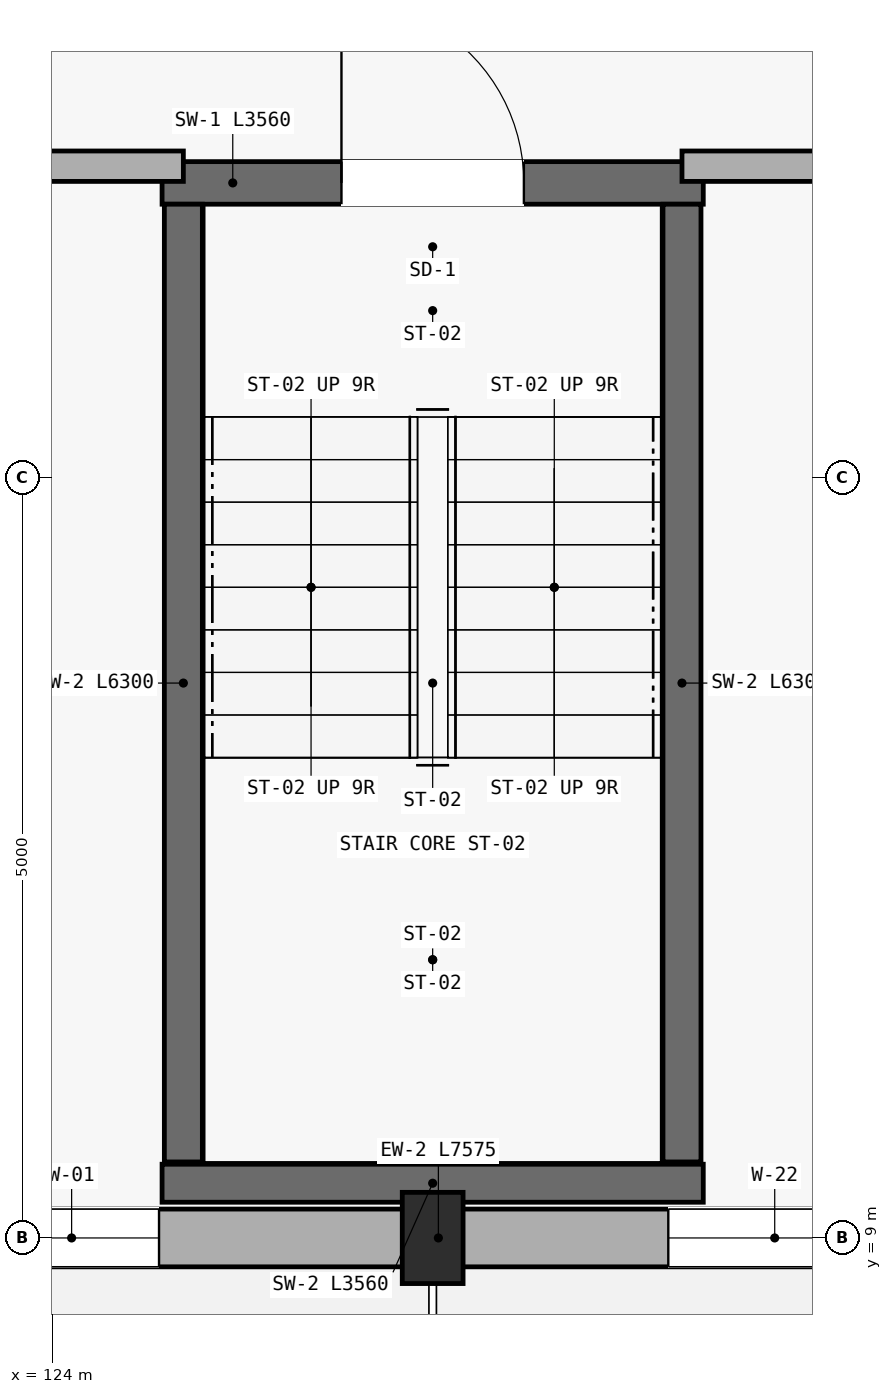
"""IFC4 building model, lengths in metres.
Left out: names, types, materials, properties, quantities, classifications, styles, units other than length and angle.
Written with IfcOpenShell. Run it as: python <this file> out.ifc"""

import sys

from ifc_helpers import new_model, si_unit, direction, frame, frame_2d, origin, origin_2d, place, context, subcontext, project, spatial, rectangle, extrude, element, fill, save


model = new_model("IFC4")
c1 = context("Model", 3, precision=1e-05, world=origin(), true_north=direction((0.0, 1.0)))
c2 = subcontext(c1, "Body", "Model", "MODEL_VIEW")
j1 = project(units=[si_unit("LENGTHUNIT", "METRE"), si_unit("PLANEANGLEUNIT", "RADIAN")], contexts=[c1])
p1 = place(None, origin())
s1 = spatial("IfcSite", under=j1, at=p1, CompositionType="ELEMENT")
p2 = place(p1, origin())
s2 = spatial("IfcBuilding", under=s1, at=p2, CompositionType="ELEMENT")
p3 = place(p2, origin())
s3 = spatial("IfcBuildingStorey", under=s2, at=p3, CompositionType="ELEMENT", Elevation=0.0)
p4 = place(p3, frame((126.5, 9.0, 0.0), z_axis=(0.0, 0.0, 1.0), x_axis=(1.0, 0.0, 0.0)))
e1 = element("IfcColumn", 1, at=p4, inside=s3, PredefinedType="PILASTER", context=c2, shape_type="SweptSolid", body=[
    extrude(rectangle(XDim=0.4, YDim=0.6, at=origin_2d()), origin(), (0.0, 0.0, 1.0), 5.85),
])
p5 = place(p3, frame((122.75, 9.0, 0.0), z_axis=(0.0, 0.0, 1.0), x_axis=(1.0, 0.0, 0.0)))
e2 = element("IfcWall", 2, at=p5, inside=s3, PredefinedType="STANDARD", context=c2, shape_type="SweptSolid", body=[
    extrude(rectangle(XDim=7.575, YDim=0.38, at=frame_2d((3.788, 0.0))), origin(), (0.0, 0.0, 1.0), 4.75),
])
p6 = place(p5, frame((0.8, 0.0, 0.75)))
e3 = element("IfcOpeningElement", 3, at=p6, cuts=e2, PredefinedType="OPENING", context=c2, shape_type="SweptSolid", body=[
    extrude(rectangle(XDim=1.15, YDim=1.45, at=frame_2d((0.575, 0.725))), frame((0.0, 0.2, 0.0), z_axis=(0.0, -1.0, 0.0), x_axis=(1.0, 0.0, 0.0)), (0.0, 0.0, 1.0), 0.4),
])
p7 = place(p5, frame((5.3, 0.0, 0.75)))
e4 = element("IfcOpeningElement", 4, at=p7, cuts=e2, PredefinedType="OPENING", context=c2, shape_type="SweptSolid", body=[
    extrude(rectangle(XDim=1.4, YDim=1.45, at=frame_2d((0.7, 0.725))), frame((0.0, 0.2, 0.0), z_axis=(0.0, -1.0, 0.0), x_axis=(1.0, 0.0, 0.0)), (0.0, 0.0, 1.0), 0.4),
])
p8 = place(p3, frame((124.72, 15.94, 0.0), z_axis=(0.0, 0.0, 1.0), x_axis=(1.0, 0.0, 0.0)))
e5 = element("IfcWall", 5, at=p8, inside=s3, PredefinedType="SHEAR", context=c2, shape_type="SweptSolid", body=[
    extrude(rectangle(XDim=3.56, YDim=0.28, at=frame_2d((1.78, 0.0))), origin(), (0.0, 0.0, 1.0), 5.6),
])
p9 = place(p8, frame((1.18, 0.0, 0.0)))
e6 = element("IfcOpeningElement", 6, at=p9, cuts=e5, PredefinedType="OPENING", context=c2, shape_type="SweptSolid", body=[
    extrude(rectangle(XDim=1.2, YDim=2.15, at=frame_2d((0.6, 1.075))), frame((0.0, 0.15, 0.0), z_axis=(0.0, -1.0, 0.0), x_axis=(1.0, 0.0, 0.0)), (0.0, 0.0, 1.0), 0.3),
])
p10 = place(p3, frame((128.28, 9.36, 0.0), z_axis=(0.0, 0.0, 1.0), x_axis=(-1.0, 0.0, 0.0)))
e7 = element("IfcWall", 7, at=p10, inside=s3, PredefinedType="SHEAR", context=c2, shape_type="SweptSolid", body=[
    extrude(rectangle(XDim=3.56, YDim=0.25, at=frame_2d((1.78, 0.0))), origin(), (0.0, 0.0, 1.0), 5.6),
])
for number, where, z_axis, x_axis in (
    (8, (124.86, 15.8, 0.0), (0.0, 0.0, 1.0), (0.0, -1.0, 0.0)),
    (9, (128.14, 9.5, 0.0), (0.0, 0.0, 1.0), (0.0, 1.0, 0.0)),
):
    element("IfcWall", number, at=place(p3, frame(where, z_axis=z_axis, x_axis=x_axis)), inside=s3, PredefinedType="SHEAR", context=c2, shape_type="SweptSolid", body=[
        extrude(rectangle(XDim=6.3, YDim=0.25, at=frame_2d((3.15, 0.0))), origin(), (0.0, 0.0, 1.0), 5.6),
    ])
p11 = place(p3, frame((121.13, 16.05, 0.0), z_axis=(0.0, 0.0, 1.0), x_axis=(1.0, 0.0, 0.0)))
e10 = element("IfcWall", 10, at=p11, inside=s3, PredefinedType="PARTITIONING", context=c2, shape_type="SweptSolid", body=[
    extrude(rectangle(XDim=3.73, YDim=0.2, at=frame_2d((1.865, 0.0))), origin(), (0.0, 0.0, 1.0), 4.19),
])
p12 = place(p3, frame((128.14, 16.05, 0.0), z_axis=(0.0, 0.0, 1.0), x_axis=(1.0, 0.0, 0.0)))
e11 = element("IfcWall", 11, at=p12, inside=s3, PredefinedType="PARTITIONING", context=c2, shape_type="SweptSolid", body=[
    extrude(rectangle(XDim=10.96, YDim=0.2, at=frame_2d((5.48, 0.0))), origin(), (0.0, 0.0, 1.0), 4.19),
])
p13 = place(p12, frame((4.98, 0.0, 0.0)))
e12 = element("IfcOpeningElement", 12, at=p13, cuts=e11, PredefinedType="OPENING", context=c2, shape_type="SweptSolid", body=[
    extrude(rectangle(XDim=1.0, YDim=2.12, at=frame_2d((0.5, 1.06))), frame((0.0, 0.11, 0.0), z_axis=(0.0, -1.0, 0.0), x_axis=(1.0, 0.0, 0.0)), (0.0, 0.0, 1.0), 0.22),
])
p14 = place(p6, origin())
e13 = element("IfcWindow", 13, at=p14, inside=s3, PartitioningType="SINGLE_PANEL", PredefinedType="WINDOW", context=c2, shape_type="SweptSolid", body=[
    extrude(rectangle(XDim=1.15, YDim=1.45, at=frame_2d((0.575, 0.725))), frame((0.0, 0.03, 0.0), z_axis=(0.0, -1.0, 0.0), x_axis=(1.0, 0.0, 0.0)), (0.0, 0.0, 1.0), 0.06),
])
fill(e3, e13)
p15 = place(p7, origin())
e14 = element("IfcWindow", 14, at=p15, inside=s3, PartitioningType="DOUBLE_PANEL_VERTICAL", PredefinedType="WINDOW", context=c2, shape_type="SweptSolid", body=[
    extrude(rectangle(XDim=1.4, YDim=1.45, at=frame_2d((0.7, 0.725))), frame((0.0, 0.03, 0.0), z_axis=(0.0, -1.0, 0.0), x_axis=(1.0, 0.0, 0.0)), (0.0, 0.0, 1.0), 0.06),
])
fill(e4, e14)
p16 = place(p9, origin())
e15 = element("IfcDoor", 15, at=p16, inside=s3, OperationType="SINGLE_SWING_LEFT", PredefinedType="DOOR", context=c2, shape_type="SweptSolid", body=[
    extrude(rectangle(XDim=1.2, YDim=2.15, at=frame_2d((0.6, 1.075))), frame((0.0, 0.025, 0.0), z_axis=(0.0, -1.0, 0.0), x_axis=(1.0, 0.0, 0.0)), (0.0, 0.0, 1.0), 0.05),
])
fill(e6, e15)
save(model, sys.argv[1])
